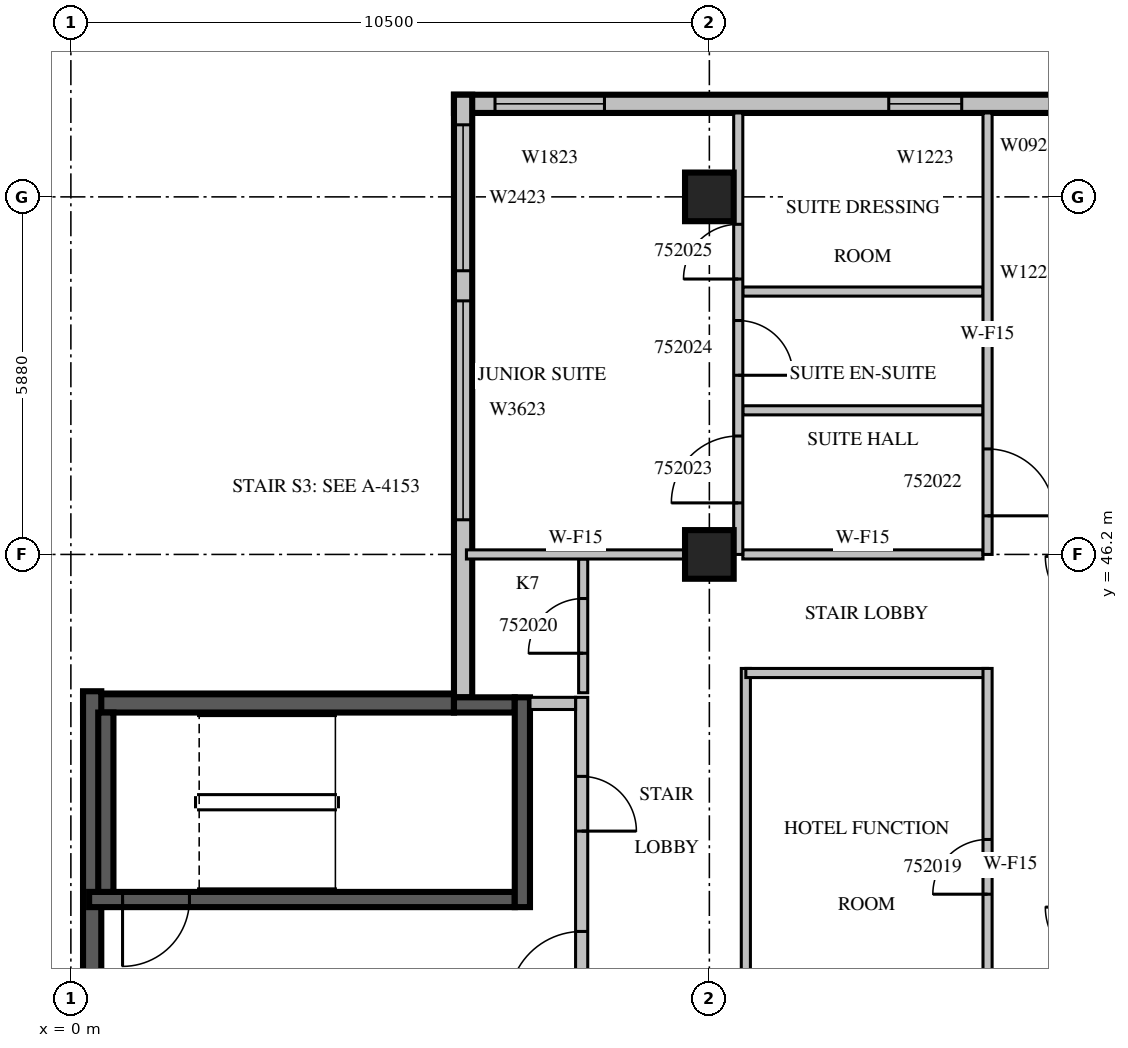
"""IFC4 building model, lengths in metres.
Left out: names, types, materials, properties, quantities, classifications, styles, units other than length and angle.
Written with IfcOpenShell. Run it as: python <this file> out.ifc"""

import sys

from ifc_helpers import new_model, si_unit, direction, frame, frame_2d, origin, origin_2d, place, context, subcontext, project, spatial, rectangle, extrude, source, transform, mapped, element, fill, save


model = new_model("IFC4")
c1 = context("Model", 3, precision=1e-05, world=origin(), true_north=direction((0.0, 1.0)))
c2 = subcontext(c1, "Body", "Model", "MODEL_VIEW")
j1 = project(units=[si_unit("LENGTHUNIT", "METRE"), si_unit("PLANEANGLEUNIT", "RADIAN")], contexts=[c1])
p1 = place(None, origin())
s1 = spatial("IfcSite", under=j1, at=p1, CompositionType="ELEMENT")
p2 = place(p1, origin())
s2 = spatial("IfcBuilding", under=s1, at=p2, CompositionType="ELEMENT")
p3 = place(p2, frame((0.0, 0.0, 231.0)))
s3 = spatial("IfcBuildingStorey", under=s2, at=p3, CompositionType="ELEMENT", Elevation=231.0)
m1 = source(origin(), c2, "Body", "SweptSolid", [
    extrude(rectangle(XDim=0.8, YDim=0.8, at=origin_2d()), origin(), (0.0, 0.0, 1.0), 3.8),
])
for number, where, z_axis, x_axis in (
    (1, (10.5, 46.2, 0.0), (0.0, 0.0, 1.0), (1.0, 0.0, 0.0)),
    (2, (10.5, 52.08, 0.0), (0.0, 0.0, 1.0), (1.0, 0.0, 0.0)),
):
    element("IfcColumn", number, at=place(p3, frame(where, z_axis=z_axis, x_axis=x_axis)), inside=s3, PredefinedType="COLUMN", context=c2, shape_type="MappedRepresentation", body=[
        mapped(m1, transform((0.0, 0.0, 0.0), scale=1.0)),
    ])
m2 = source(origin(), c2, "Body", "SweptSolid", [
    extrude(rectangle(XDim=10.5, YDim=0.3, at=frame_2d((5.25, 0.0))), origin(), (0.0, 0.0, 1.0), 3.4),
])
p4 = place(p3, frame((16.8, 53.61, 0.0), z_axis=(0.0, 0.0, 1.0), x_axis=(-1.0, 0.0, 0.0)))
e3 = element("IfcWall", 3, at=p4, inside=s3, PredefinedType="STANDARD", context=c2, shape_type="MappedRepresentation", body=[
    mapped(m2, transform((0.0, 0.0, 0.0), scale=1.0)),
])
m3 = source(origin(), c2, "Body", "SweptSolid", [
    extrude(rectangle(XDim=1.2, YDim=2.3, at=frame_2d((0.6, 1.15))), frame((0.0, 0.16, 0.0), z_axis=(0.0, -1.0, 0.0), x_axis=(1.0, 0.0, 0.0)), (0.0, 0.0, 1.0), 0.32),
])
p5 = place(p4, frame((2.15, 0.0, 0.6)))
e4 = element("IfcOpeningElement", 4, at=p5, cuts=e3, PredefinedType="OPENING", context=c2, shape_type="MappedRepresentation", body=[
    mapped(m3, transform((0.0, 0.0, 0.0), scale=1.0)),
])
m4 = source(origin(), c2, "Body", "SweptSolid", [
    extrude(rectangle(XDim=1.8, YDim=2.3, at=frame_2d((0.9, 1.15))), frame((0.0, 0.16, 0.0), z_axis=(0.0, -1.0, 0.0), x_axis=(1.0, 0.0, 0.0)), (0.0, 0.0, 1.0), 0.32),
])
p6 = place(p4, frame((8.025, 0.0, 0.6)))
e5 = element("IfcOpeningElement", 5, at=p6, cuts=e3, PredefinedType="OPENING", context=c2, shape_type="MappedRepresentation", body=[
    mapped(m4, transform((0.0, 0.0, 0.0), scale=1.0)),
])
m5 = source(origin(), c2, "Body", "SweptSolid", [
    extrude(rectangle(XDim=9.91, YDim=0.3, at=frame_2d((4.955, 0.0))), origin(), (0.0, 0.0, 1.0), 3.4),
])
p7 = place(p3, frame((6.45, 53.76, 0.0), z_axis=(0.0, 0.0, 1.0), x_axis=(0.0, -1.0, 0.0)))
e6 = element("IfcWall", 6, at=p7, inside=s3, PredefinedType="STANDARD", context=c2, shape_type="MappedRepresentation", body=[
    mapped(m5, transform((0.0, 0.0, 0.0), scale=1.0)),
])
m6 = source(origin(), c2, "Body", "SweptSolid", [
    extrude(rectangle(XDim=3.6, YDim=2.3, at=frame_2d((1.8, 1.15))), frame((0.0, 0.16, 0.0), z_axis=(0.0, -1.0, 0.0), x_axis=(1.0, 0.0, 0.0)), (0.0, 0.0, 1.0), 0.32),
])
p8 = place(p7, frame((3.39, 0.0, 0.6)))
e7 = element("IfcOpeningElement", 7, at=p8, cuts=e6, PredefinedType="OPENING", context=c2, shape_type="MappedRepresentation", body=[
    mapped(m6, transform((0.0, 0.0, 0.0), scale=1.0)),
])
m7 = source(origin(), c2, "Body", "SweptSolid", [
    extrude(rectangle(XDim=2.4, YDim=2.3, at=frame_2d((1.2, 1.15))), frame((0.0, 0.16, 0.0), z_axis=(0.0, -1.0, 0.0), x_axis=(1.0, 0.0, 0.0)), (0.0, 0.0, 1.0), 0.32),
])
p9 = place(p7, frame((0.495, 0.0, 0.6)))
e8 = element("IfcOpeningElement", 8, at=p9, cuts=e6, PredefinedType="OPENING", context=c2, shape_type="MappedRepresentation", body=[
    mapped(m7, transform((0.0, 0.0, 0.0), scale=1.0)),
])
m8 = source(origin(), c2, "Body", "SweptSolid", [
    extrude(rectangle(XDim=6.1, YDim=0.3, at=frame_2d((3.05, 0.0))), origin(), (0.0, 0.0, 1.0), 3.4),
])
p10 = place(p3, frame((6.3, 43.75, 0.0), z_axis=(0.0, 0.0, 1.0), x_axis=(-1.0, 0.0, 0.0)))
e9 = element("IfcWall", 9, at=p10, inside=s3, PredefinedType="SOLIDWALL", context=c2, shape_type="MappedRepresentation", body=[
    mapped(m8, transform((0.0, 0.0, 0.0), scale=1.0)),
])
m9 = source(origin(), c2, "Body", "SweptSolid", [
    extrude(rectangle(XDim=5.65, YDim=0.3, at=frame_2d((2.825, 0.0))), origin(), (0.0, 0.0, 1.0), 3.4),
])
p11 = place(p3, frame((0.35, 43.95, 0.0), z_axis=(0.0, 0.0, 1.0), x_axis=(0.0, -1.0, 0.0)))
e10 = element("IfcWall", 10, at=p11, inside=s3, PredefinedType="SOLIDWALL", context=c2, shape_type="MappedRepresentation", body=[
    mapped(m9, transform((0.0, 0.0, 0.0), scale=1.0)),
])
m10 = source(origin(), c2, "Body", "SweptSolid", [
    extrude(rectangle(XDim=7.0, YDim=0.25, at=frame_2d((3.5, 0.0))), origin(), (0.0, 0.0, 1.0), 3.4),
])
p12 = place(p3, frame((0.3, 40.525, 0.0), z_axis=(0.0, 0.0, 1.0), x_axis=(1.0, 0.0, 0.0)))
e11 = element("IfcWall", 11, at=p12, inside=s3, PredefinedType="SOLIDWALL", context=c2, shape_type="MappedRepresentation", body=[
    mapped(m10, transform((0.0, 0.0, 0.0), scale=1.0)),
])
m11 = source(origin(), c2, "Body", "SweptSolid", [
    extrude(rectangle(XDim=1.1, YDim=2.1, at=frame_2d((0.55, 1.05))), frame((0.0, 0.135, 0.0), z_axis=(0.0, -1.0, 0.0), x_axis=(1.0, 0.0, 0.0)), (0.0, 0.0, 1.0), 0.27),
])
p13 = place(p12, frame((0.55, 0.0, 0.0)))
e12 = element("IfcOpeningElement", 12, at=p13, cuts=e11, PredefinedType="OPENING", context=c2, shape_type="MappedRepresentation", body=[
    mapped(m11, transform((0.0, 0.0, 0.0), scale=1.0)),
])
m12 = source(origin(), c2, "Body", "SweptSolid", [
    extrude(rectangle(XDim=1.0, YDim=0.25, at=frame_2d((0.5, 0.0))), origin(), (0.0, 0.0, 1.0), 3.4),
])
p14 = place(p3, frame((6.3, 43.725, 0.0), z_axis=(0.0, 0.0, 1.0), x_axis=(1.0, 0.0, 0.0)))
e13 = element("IfcWall", 13, at=p14, inside=s3, PredefinedType="SOLIDWALL", context=c2, shape_type="MappedRepresentation", body=[
    mapped(m12, transform((0.0, 0.0, 0.0), scale=1.0)),
])
m13 = source(origin(), c2, "Body", "SweptSolid", [
    extrude(rectangle(XDim=3.45, YDim=0.25, at=frame_2d((1.725, 0.0))), origin(), (0.0, 0.0, 1.0), 3.4),
])
p15 = place(p3, frame((7.425, 40.4, 0.0), z_axis=(0.0, 0.0, 1.0), x_axis=(0.0, 1.0, 0.0)))
e14 = element("IfcWall", 14, at=p15, inside=s3, PredefinedType="SOLIDWALL", context=c2, shape_type="MappedRepresentation", body=[
    mapped(m13, transform((0.0, 0.0, 0.0), scale=1.0)),
])
m14 = source(origin(), c2, "Body", "SweptSolid", [
    extrude(rectangle(XDim=2.95, YDim=0.25, at=frame_2d((1.475, 0.0))), origin(), (0.0, 0.0, 1.0), 3.4),
])
p16 = place(p3, frame((0.575, 40.65, 0.0), z_axis=(0.0, 0.0, 1.0), x_axis=(0.0, 1.0, 0.0)))
e15 = element("IfcWall", 15, at=p16, inside=s3, PredefinedType="SOLIDWALL", context=c2, shape_type="MappedRepresentation", body=[
    mapped(m14, transform((0.0, 0.0, 0.0), scale=1.0)),
])
m15 = source(origin(), c2, "Body", "SweptSolid", [
    extrude(rectangle(XDim=5.45, YDim=0.2, at=frame_2d((2.725, 0.0))), origin(), (0.0, 0.0, 1.0), 3.4),
])
p17 = place(p3, frame((8.4, 38.4, 0.0), z_axis=(0.0, 0.0, 1.0), x_axis=(0.0, 1.0, 0.0)))
e16 = element("IfcWall", 16, at=p17, inside=s3, PredefinedType="PARTITIONING", context=c2, shape_type="MappedRepresentation", body=[
    mapped(m15, transform((0.0, 0.0, 0.0), scale=1.0)),
])
m16 = source(origin(), c2, "Body", "SweptSolid", [
    extrude(rectangle(XDim=1.2, YDim=2.1, at=frame_2d((0.6, 1.05))), frame((0.0, 0.11, 0.0), z_axis=(0.0, -1.0, 0.0), x_axis=(1.0, 0.0, 0.0)), (0.0, 0.0, 1.0), 0.22),
])
p18 = place(p17, frame((0.4, 0.0, 0.0)))
e17 = element("IfcOpeningElement", 17, at=p18, cuts=e16, PredefinedType="OPENING", context=c2, shape_type="MappedRepresentation", body=[
    mapped(m16, transform((0.0, 0.0, 0.0), scale=1.0)),
])
m17 = source(origin(), c2, "Body", "SweptSolid", [
    extrude(rectangle(XDim=0.9, YDim=2.1, at=frame_2d((0.45, 1.05))), frame((0.0, 0.11, 0.0), z_axis=(0.0, -1.0, 0.0), x_axis=(1.0, 0.0, 0.0)), (0.0, 0.0, 1.0), 0.22),
])
p19 = place(p17, frame((3.25, 0.0, 0.0)))
e18 = element("IfcOpeningElement", 18, at=p19, cuts=e16, PredefinedType="OPENING", context=c2, shape_type="MappedRepresentation", body=[
    mapped(m17, transform((0.0, 0.0, 0.0), scale=1.0)),
])
m18 = source(origin(), c2, "Body", "SweptSolid", [
    extrude(rectangle(XDim=0.75, YDim=0.2, at=frame_2d((0.375, 0.0))), origin(), (0.0, 0.0, 1.0), 3.4),
])
p20 = place(p3, frame((7.55, 43.75, 0.0), z_axis=(0.0, 0.0, 1.0), x_axis=(1.0, 0.0, 0.0)))
e19 = element("IfcWall", 19, at=p20, inside=s3, PredefinedType="PARTITIONING", context=c2, shape_type="MappedRepresentation", body=[
    mapped(m18, transform((0.0, 0.0, 0.0), scale=1.0)),
])
m19 = source(origin(), c2, "Body", "SweptSolid", [
    extrude(rectangle(XDim=6.45, YDim=0.15, at=frame_2d((3.225, 0.0))), origin(), (0.0, 0.0, 1.0), 3.4),
])
p21 = place(p3, frame((11.1, 44.325, 0.0), z_axis=(0.0, 0.0, 1.0), x_axis=(0.0, -1.0, 0.0)))
e20 = element("IfcWall", 20, at=p21, inside=s3, PredefinedType="PARTITIONING", context=c2, shape_type="MappedRepresentation", body=[
    mapped(m19, transform((0.0, 0.0, 0.0), scale=1.0)),
])
m20 = source(origin(), c2, "Body", "SweptSolid", [
    extrude(rectangle(XDim=3.975, YDim=0.15, at=frame_2d((1.988, 0.0))), origin(), (0.0, 0.0, 1.0), 3.4),
])
p22 = place(p3, frame((15.075, 44.25, 0.0), z_axis=(0.0, 0.0, 1.0), x_axis=(-1.0, 0.0, 0.0)))
e21 = element("IfcWall", 21, at=p22, inside=s3, PredefinedType="PARTITIONING", context=c2, shape_type="MappedRepresentation", body=[
    mapped(m20, transform((0.0, 0.0, 0.0), scale=1.0)),
])
p23 = place(p3, frame((15.075, 37.875, 0.0), z_axis=(0.0, 0.0, 1.0), x_axis=(0.0, 1.0, 0.0)))
e22 = element("IfcWall", 22, at=p23, inside=s3, PredefinedType="PARTITIONING", context=c2, shape_type="MappedRepresentation", body=[
    mapped(m19, transform((0.0, 0.0, 0.0), scale=1.0)),
])
m21 = source(origin(), c2, "Body", "SweptSolid", [
    extrude(rectangle(XDim=0.9, YDim=2.1, at=frame_2d((0.45, 1.05))), frame((0.0, 0.085, 0.0), z_axis=(0.0, -1.0, 0.0), x_axis=(1.0, 0.0, 0.0)), (0.0, 0.0, 1.0), 0.17),
])
p24 = place(p23, frame((2.737, 0.0, 0.0)))
e23 = element("IfcOpeningElement", 23, at=p24, cuts=e22, PredefinedType="OPENING", context=c2, shape_type="MappedRepresentation", body=[
    mapped(m21, transform((0.0, 0.0, 0.0), scale=1.0)),
])
m22 = source(origin(), c2, "Body", "SweptSolid", [
    extrude(rectangle(XDim=2.2, YDim=0.15, at=frame_2d((1.1, 0.0))), origin(), (0.0, 0.0, 1.0), 3.4),
])
p25 = place(p3, frame((8.425, 43.925, 0.0), z_axis=(0.0, 0.0, 1.0), x_axis=(0.0, 1.0, 0.0)))
e24 = element("IfcWall", 24, at=p25, inside=s3, PredefinedType="PARTITIONING", context=c2, shape_type="MappedRepresentation", body=[
    mapped(m22, transform((0.0, 0.0, 0.0), scale=1.0)),
])
p26 = place(p25, frame((0.65, 0.0, 0.0)))
e25 = element("IfcOpeningElement", 25, at=p26, cuts=e24, PredefinedType="OPENING", context=c2, shape_type="MappedRepresentation", body=[
    mapped(m21, transform((0.0, 0.0, 0.0), scale=1.0)),
])
m23 = source(origin(), c2, "Body", "SweptSolid", [
    extrude(rectangle(XDim=3.95, YDim=0.15, at=frame_2d((1.975, 0.0))), origin(), (0.0, 0.0, 1.0), 3.4),
])
for number, where, z_axis, x_axis in (
    (26, (15.0, 48.57, 0.0), (0.0, 0.0, 1.0), (-1.0, 0.0, 0.0)),
    (27, (15.0, 50.523, 0.0), (0.0, 0.0, 1.0), (-1.0, 0.0, 0.0)),
):
    element("IfcWall", number, at=place(p3, frame(where, z_axis=z_axis, x_axis=x_axis)), inside=s3, PredefinedType="PARTITIONING", context=c2, shape_type="MappedRepresentation", body=[
        mapped(m23, transform((0.0, 0.0, 0.0), scale=1.0)),
    ])
m24 = source(origin(), c2, "Body", "SweptSolid", [
    extrude(rectangle(XDim=3.596, YDim=0.15, at=frame_2d((1.798, 0.0))), origin(), (0.0, 0.0, 1.0), 3.4),
])
p27 = place(p3, frame((10.101, 46.2, 0.0), z_axis=(0.0, 0.0, 1.0), x_axis=(-1.0, 0.0, 0.0)))
e28 = element("IfcWall", 28, at=p27, inside=s3, PredefinedType="PARTITIONING", context=c2, shape_type="MappedRepresentation", body=[
    mapped(m24, transform((0.0, 0.0, 0.0), scale=1.0)),
])
p28 = place(p3, frame((15.0, 46.2, 0.0), z_axis=(0.0, 0.0, 1.0), x_axis=(-1.0, 0.0, 0.0)))
e29 = element("IfcWall", 29, at=p28, inside=s3, PredefinedType="PARTITIONING", context=c2, shape_type="MappedRepresentation", body=[
    mapped(m23, transform((0.0, 0.0, 0.0), scale=1.0)),
])
m25 = source(origin(), c2, "Body", "SweptSolid", [
    extrude(rectangle(XDim=7.26, YDim=0.15, at=frame_2d((3.63, 0.0))), origin(), (0.0, 0.0, 1.0), 3.4),
])
p29 = place(p3, frame((10.975, 46.2, 0.0), z_axis=(0.0, 0.0, 1.0), x_axis=(0.0, 1.0, 0.0)))
e30 = element("IfcWall", 30, at=p29, inside=s3, PredefinedType="PARTITIONING", context=c2, shape_type="MappedRepresentation", body=[
    mapped(m25, transform((0.0, 0.0, 0.0), scale=1.0)),
])
m26 = source(origin(), c2, "Body", "SweptSolid", [
    extrude(rectangle(XDim=1.1, YDim=2.1, at=frame_2d((0.55, 1.05))), frame((0.0, 0.085, 0.0), z_axis=(0.0, -1.0, 0.0), x_axis=(1.0, 0.0, 0.0)), (0.0, 0.0, 1.0), 0.17),
])
p30 = place(p29, frame((0.847, 0.0, 0.0)))
e31 = element("IfcOpeningElement", 31, at=p30, cuts=e30, PredefinedType="OPENING", context=c2, shape_type="MappedRepresentation", body=[
    mapped(m26, transform((0.0, 0.0, 0.0), scale=1.0)),
])
p31 = place(p29, frame((2.946, 0.0, 0.0)))
e32 = element("IfcOpeningElement", 32, at=p31, cuts=e30, PredefinedType="OPENING", context=c2, shape_type="MappedRepresentation", body=[
    mapped(m21, transform((0.0, 0.0, 0.0), scale=1.0)),
])
p32 = place(p29, frame((4.529, 0.0, 0.0)))
e33 = element("IfcOpeningElement", 33, at=p32, cuts=e30, PredefinedType="OPENING", context=c2, shape_type="MappedRepresentation", body=[
    mapped(m21, transform((0.0, 0.0, 0.0), scale=1.0)),
])
p33 = place(p3, frame((15.075, 46.2, 0.0), z_axis=(0.0, 0.0, 1.0), x_axis=(0.0, 1.0, 0.0)))
e34 = element("IfcWall", 34, at=p33, inside=s3, PredefinedType="PARTITIONING", context=c2, shape_type="MappedRepresentation", body=[
    mapped(m25, transform((0.0, 0.0, 0.0), scale=1.0)),
])
p34 = place(p33, frame((0.635, 0.0, 0.0)))
e35 = element("IfcOpeningElement", 35, at=p34, cuts=e34, PredefinedType="OPENING", context=c2, shape_type="MappedRepresentation", body=[
    mapped(m26, transform((0.0, 0.0, 0.0), scale=1.0)),
])
m27 = source(origin(), c2, "Body", "SweptSolid", [
    extrude(rectangle(XDim=1.2, YDim=2.3, at=frame_2d((0.6, 1.15))), frame((0.0, 0.03, 0.0), z_axis=(0.0, -1.0, 0.0), x_axis=(1.0, 0.0, 0.0)), (0.0, 0.0, 1.0), 0.06),
])
p35 = place(p5, origin())
e36 = element("IfcWindow", 36, at=p35, inside=s3, PartitioningType="SINGLE_PANEL", PredefinedType="WINDOW", context=c2, shape_type="MappedRepresentation", body=[
    mapped(m27, transform((0.0, 0.0, 0.0), scale=1.0)),
])
fill(e4, e36)
m28 = source(origin(), c2, "Body", "SweptSolid", [
    extrude(rectangle(XDim=1.8, YDim=2.3, at=frame_2d((0.9, 1.15))), frame((0.0, 0.03, 0.0), z_axis=(0.0, -1.0, 0.0), x_axis=(1.0, 0.0, 0.0)), (0.0, 0.0, 1.0), 0.06),
])
p36 = place(p6, origin())
e37 = element("IfcWindow", 37, at=p36, inside=s3, PartitioningType="SINGLE_PANEL", PredefinedType="WINDOW", context=c2, shape_type="MappedRepresentation", body=[
    mapped(m28, transform((0.0, 0.0, 0.0), scale=1.0)),
])
fill(e5, e37)
m29 = source(origin(), c2, "Body", "SweptSolid", [
    extrude(rectangle(XDim=3.6, YDim=2.3, at=frame_2d((1.8, 1.15))), frame((0.0, 0.03, 0.0), z_axis=(0.0, -1.0, 0.0), x_axis=(1.0, 0.0, 0.0)), (0.0, 0.0, 1.0), 0.06),
])
p37 = place(p8, origin())
e38 = element("IfcWindow", 38, at=p37, inside=s3, PartitioningType="SINGLE_PANEL", PredefinedType="WINDOW", context=c2, shape_type="MappedRepresentation", body=[
    mapped(m29, transform((0.0, 0.0, 0.0), scale=1.0)),
])
fill(e7, e38)
m30 = source(origin(), c2, "Body", "SweptSolid", [
    extrude(rectangle(XDim=2.4, YDim=2.3, at=frame_2d((1.2, 1.15))), frame((0.0, 0.03, 0.0), z_axis=(0.0, -1.0, 0.0), x_axis=(1.0, 0.0, 0.0)), (0.0, 0.0, 1.0), 0.06),
])
p38 = place(p9, origin())
e39 = element("IfcWindow", 39, at=p38, inside=s3, PartitioningType="SINGLE_PANEL", PredefinedType="WINDOW", context=c2, shape_type="MappedRepresentation", body=[
    mapped(m30, transform((0.0, 0.0, 0.0), scale=1.0)),
])
fill(e8, e39)
m31 = source(origin(), c2, "Body", "SweptSolid", [
    extrude(rectangle(XDim=1.1, YDim=2.1, at=frame_2d((0.55, 1.05))), frame((0.0, 0.025, 0.0), z_axis=(0.0, -1.0, 0.0), x_axis=(1.0, 0.0, 0.0)), (0.0, 0.0, 1.0), 0.05),
])
p39 = place(p13, origin())
e40 = element("IfcDoor", 40, at=p39, inside=s3, OperationType="SINGLE_SWING_RIGHT", PredefinedType="DOOR", context=c2, shape_type="MappedRepresentation", body=[
    mapped(m31, transform((0.0, 0.0, 0.0), scale=1.0)),
])
fill(e12, e40)
m32 = source(origin(), c2, "Body", "SweptSolid", [
    extrude(rectangle(XDim=1.2, YDim=2.1, at=frame_2d((0.6, 1.05))), frame((0.0, 0.025, 0.0), z_axis=(0.0, -1.0, 0.0), x_axis=(1.0, 0.0, 0.0)), (0.0, 0.0, 1.0), 0.05),
])
p40 = place(p18, origin())
e41 = element("IfcDoor", 41, at=p40, inside=s3, OperationType="SINGLE_SWING_LEFT", PredefinedType="DOOR", context=c2, shape_type="MappedRepresentation", body=[
    mapped(m32, transform((0.0, 0.0, 0.0), scale=1.0)),
])
fill(e17, e41)
m33 = source(origin(), c2, "Body", "SweptSolid", [
    extrude(rectangle(XDim=0.9, YDim=2.1, at=frame_2d((0.45, 1.05))), frame((0.0, 0.025, 0.0), z_axis=(0.0, -1.0, 0.0), x_axis=(1.0, 0.0, 0.0)), (0.0, 0.0, 1.0), 0.05),
])
p41 = place(p19, origin())
e42 = element("IfcDoor", 42, at=p41, inside=s3, OperationType="SINGLE_SWING_RIGHT", PredefinedType="DOOR", context=c2, shape_type="MappedRepresentation", body=[
    mapped(m33, transform((0.0, 0.0, 0.0), scale=1.0)),
])
fill(e18, e42)
p42 = place(p24, origin())
e43 = element("IfcDoor", 43, at=p42, inside=s3, OperationType="SINGLE_SWING_LEFT", PredefinedType="DOOR", context=c2, shape_type="MappedRepresentation", body=[
    mapped(m33, transform((0.0, 0.0, 0.0), scale=1.0)),
])
fill(e23, e43)
p43 = place(p26, origin())
e44 = element("IfcDoor", 44, at=p43, inside=s3, OperationType="SINGLE_SWING_LEFT", PredefinedType="DOOR", context=c2, shape_type="MappedRepresentation", body=[
    mapped(m33, transform((0.0, 0.0, 0.0), scale=1.0)),
])
fill(e25, e44)
p44 = place(p34, origin())
e45 = element("IfcDoor", 45, at=p44, inside=s3, OperationType="SINGLE_SWING_RIGHT", PredefinedType="DOOR", context=c2, shape_type="MappedRepresentation", body=[
    mapped(m31, transform((0.0, 0.0, 0.0), scale=1.0)),
])
fill(e35, e45)
p45 = place(p30, origin())
e46 = element("IfcDoor", 46, at=p45, inside=s3, OperationType="SINGLE_SWING_LEFT", PredefinedType="DOOR", context=c2, shape_type="MappedRepresentation", body=[
    mapped(m31, transform((0.0, 0.0, 0.0), scale=1.0)),
])
fill(e31, e46)
p46 = place(p31, origin())
e47 = element("IfcDoor", 47, at=p46, inside=s3, OperationType="SINGLE_SWING_RIGHT", PredefinedType="DOOR", context=c2, shape_type="MappedRepresentation", body=[
    mapped(m33, transform((0.0, 0.0, 0.0), scale=1.0)),
])
fill(e32, e47)
p47 = place(p32, origin())
e48 = element("IfcDoor", 48, at=p47, inside=s3, OperationType="SINGLE_SWING_LEFT", PredefinedType="DOOR", context=c2, shape_type="MappedRepresentation", body=[
    mapped(m33, transform((0.0, 0.0, 0.0), scale=1.0)),
])
fill(e33, e48)
save(model, sys.argv[1])
